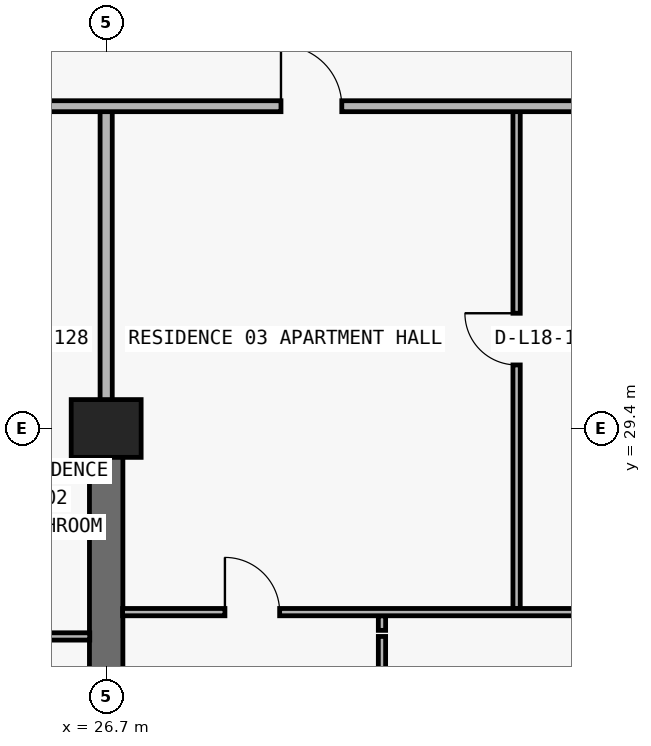
"""IFC4 building model, lengths in metres.
Left out: names, types, materials, properties, quantities, classifications, styles, units other than length and angle.
Written with IfcOpenShell. Run it as: python <this file> out.ifc"""

import sys

from ifc_helpers import new_model, si_unit, direction, frame, frame_2d, origin, origin_2d, place, context, subcontext, project, spatial, rectangle, extrude, element, fill, save


model = new_model("IFC4")
c1 = context("Model", 3, precision=1e-05, world=origin(), true_north=direction((0.0, 1.0)))
c2 = subcontext(c1, "Body", "Model", "MODEL_VIEW")
j1 = project(units=[si_unit("LENGTHUNIT", "METRE"), si_unit("PLANEANGLEUNIT", "RADIAN")], contexts=[c1])
p1 = place(None, origin())
s1 = spatial("IfcSite", under=j1, at=p1, CompositionType="ELEMENT")
p2 = place(p1, origin())
s2 = spatial("IfcBuilding", under=s1, at=p2, CompositionType="ELEMENT")
p3 = place(p2, frame((0.0, 0.0, 69.6)))
s3 = spatial("IfcBuildingStorey", under=s2, at=p3, CompositionType="ELEMENT", Elevation=69.6)
p4 = place(p3, frame((26.7, 29.4, 0.0), z_axis=(0.0, 0.0, 1.0), x_axis=(1.0, 0.0, 0.0)))
e1 = element("IfcColumn", 1, at=p4, inside=s3, PredefinedType="COLUMN", context=c2, shape_type="SweptSolid", body=[
    extrude(rectangle(XDim=1.15, YDim=0.95, at=origin_2d()), origin(), (0.0, 0.0, 1.0), 3.05),
])
p5 = place(p3, frame((26.7, 20.8, 0.0), z_axis=(0.0, 0.0, 1.0), x_axis=(0.0, 1.0, 0.0)))
e2 = element("IfcWall", 2, at=p5, inside=s3, PredefinedType="SHEAR", context=c2, shape_type="SweptSolid", body=[
    extrude(rectangle(XDim=8.6, YDim=0.55, at=frame_2d((4.3, 0.0))), origin(), (0.0, 0.0, 1.0), 3.05),
])
p6 = place(p3, frame((26.7, 29.405, 0.0), z_axis=(0.0, 0.0, 1.0), x_axis=(0.0, 1.0, 0.0)))
e3 = element("IfcWall", 3, at=p6, inside=s3, PredefinedType="PARTITIONING", context=c2, shape_type="SweptSolid", body=[
    extrude(rectangle(XDim=5.295, YDim=0.2, at=frame_2d((2.647, 0.0))), origin(), (0.0, 0.0, 1.0), 2.335),
])
p7 = place(p3, frame((31.236, 21.29, 0.0), z_axis=(0.0, 0.0, 1.0), x_axis=(0.0, 1.0, 0.0)))
e4 = element("IfcWall", 4, at=p7, inside=s3, PredefinedType="PARTITIONING", context=c2, shape_type="SweptSolid", body=[
    extrude(rectangle(XDim=4.69, YDim=0.12, at=frame_2d((2.345, 0.0))), origin(), (0.0, 0.0, 1.0), 3.05),
])
p8 = place(p7, frame((1.895, 0.0, 0.0)))
e5 = element("IfcOpeningElement", 5, at=p8, cuts=e4, PredefinedType="OPENING", context=c2, shape_type="SweptSolid", body=[
    extrude(rectangle(XDim=0.9, YDim=2.15, at=frame_2d((0.45, 1.075))), frame((0.0, 0.07, 0.0), z_axis=(0.0, -1.0, 0.0), x_axis=(1.0, 0.0, 0.0)), (0.0, 0.0, 1.0), 0.14),
])
p9 = place(p3, frame((31.236, 26.08, 0.0), z_axis=(0.0, 0.0, 1.0), x_axis=(0.0, 1.0, 0.0)))
e6 = element("IfcWall", 6, at=p9, inside=s3, PredefinedType="PARTITIONING", context=c2, shape_type="SweptSolid", body=[
    extrude(rectangle(XDim=0.24, YDim=0.12, at=frame_2d((0.12, 0.0))), origin(), (0.0, 0.0, 1.0), 3.05),
])
p10 = place(p3, frame((33.45, 26.44, 0.0), z_axis=(0.0, 0.0, 1.0), x_axis=(0.0, 1.0, 0.0)))
e7 = element("IfcWall", 7, at=p10, inside=s3, PredefinedType="PARTITIONING", context=c2, shape_type="SweptSolid", body=[
    extrude(rectangle(XDim=8.26, YDim=0.12, at=frame_2d((4.13, 0.0))), origin(), (0.0, 0.0, 1.0), 3.05),
])
p11 = place(p10, frame((4.005, 0.0, 0.0)))
e8 = element("IfcOpeningElement", 8, at=p11, cuts=e7, PredefinedType="OPENING", context=c2, shape_type="SweptSolid", body=[
    extrude(rectangle(XDim=0.85, YDim=2.1, at=frame_2d((0.425, 1.05))), frame((0.0, 0.07, 0.0), z_axis=(0.0, -1.0, 0.0), x_axis=(1.0, 0.0, 0.0)), (0.0, 0.0, 1.0), 0.14),
])
p12 = place(p3, frame((18.3, 25.98, 0.0), z_axis=(0.0, 0.0, 1.0), x_axis=(1.0, 0.0, 0.0)))
e9 = element("IfcWall", 9, at=p12, inside=s3, PredefinedType="PARTITIONING", context=c2, shape_type="SweptSolid", body=[
    extrude(rectangle(XDim=8.13, YDim=0.12, at=frame_2d((4.065, 0.0))), origin(), (0.0, 0.0, 1.0), 3.05),
])
p13 = place(p12, frame((1.693, 0.0, 0.0)))
e10 = element("IfcOpeningElement", 10, at=p13, cuts=e9, PredefinedType="OPENING", context=c2, shape_type="SweptSolid", body=[
    extrude(rectangle(XDim=0.9, YDim=2.15, at=frame_2d((0.45, 1.075))), frame((0.0, 0.07, 0.0), z_axis=(0.0, -1.0, 0.0), x_axis=(1.0, 0.0, 0.0)), (0.0, 0.0, 1.0), 0.14),
])
p14 = place(p3, frame((26.97, 26.38, 0.0), z_axis=(0.0, 0.0, 1.0), x_axis=(1.0, 0.0, 0.0)))
e11 = element("IfcWall", 11, at=p14, inside=s3, PredefinedType="PARTITIONING", context=c2, shape_type="SweptSolid", body=[
    extrude(rectangle(XDim=8.13, YDim=0.12, at=frame_2d((4.065, 0.0))), origin(), (0.0, 0.0, 1.0), 3.05),
])
p15 = place(p14, frame((1.683, 0.0, 0.0)))
e12 = element("IfcOpeningElement", 12, at=p15, cuts=e11, PredefinedType="OPENING", context=c2, shape_type="SweptSolid", body=[
    extrude(rectangle(XDim=0.9, YDim=2.15, at=frame_2d((0.45, 1.075))), frame((0.0, 0.07, 0.0), z_axis=(0.0, -1.0, 0.0), x_axis=(1.0, 0.0, 0.0)), (0.0, 0.0, 1.0), 0.14),
])
p16 = place(p3, frame((5.105, 34.7, 0.0), z_axis=(0.0, 0.0, 1.0), x_axis=(1.0, 0.0, 0.0)))
e13 = element("IfcWall", 13, at=p16, inside=s3, PredefinedType="PARTITIONING", context=c2, shape_type="SweptSolid", body=[
    extrude(rectangle(XDim=67.595, YDim=0.18, at=frame_2d((33.797, 0.0))), origin(), (0.0, 0.0, 1.0), 3.05),
])
p17 = place(p16, frame((7.67, 0.0, 0.0)))
e14 = element("IfcOpeningElement", 14, at=p17, cuts=e13, PredefinedType="OPENING", context=c2, shape_type="SweptSolid", body=[
    extrude(rectangle(XDim=1.0, YDim=2.2, at=frame_2d((0.5, 1.1))), frame((0.0, 0.1, 0.0), z_axis=(0.0, -1.0, 0.0), x_axis=(1.0, 0.0, 0.0)), (0.0, 0.0, 1.0), 0.2),
])
p18 = place(p16, frame((16.07, 0.0, 0.0)))
e15 = element("IfcOpeningElement", 15, at=p18, cuts=e13, PredefinedType="OPENING", context=c2, shape_type="SweptSolid", body=[
    extrude(rectangle(XDim=1.0, YDim=2.2, at=frame_2d((0.5, 1.1))), frame((0.0, 0.1, 0.0), z_axis=(0.0, -1.0, 0.0), x_axis=(1.0, 0.0, 0.0)), (0.0, 0.0, 1.0), 0.2),
])
p19 = place(p16, frame((24.47, 0.0, 0.0)))
e16 = element("IfcOpeningElement", 16, at=p19, cuts=e13, PredefinedType="OPENING", context=c2, shape_type="SweptSolid", body=[
    extrude(rectangle(XDim=1.0, YDim=2.2, at=frame_2d((0.5, 1.1))), frame((0.0, 0.1, 0.0), z_axis=(0.0, -1.0, 0.0), x_axis=(1.0, 0.0, 0.0)), (0.0, 0.0, 1.0), 0.2),
])
p20 = place(p16, frame((32.47, 0.0, 0.0)))
e17 = element("IfcOpeningElement", 17, at=p20, cuts=e13, PredefinedType="OPENING", context=c2, shape_type="SweptSolid", body=[
    extrude(rectangle(XDim=1.0, YDim=2.2, at=frame_2d((0.5, 1.1))), frame((0.0, 0.1, 0.0), z_axis=(0.0, -1.0, 0.0), x_axis=(1.0, 0.0, 0.0)), (0.0, 0.0, 1.0), 0.2),
])
p21 = place(p16, frame((40.47, 0.0, 0.0)))
e18 = element("IfcOpeningElement", 18, at=p21, cuts=e13, PredefinedType="OPENING", context=c2, shape_type="SweptSolid", body=[
    extrude(rectangle(XDim=1.0, YDim=2.2, at=frame_2d((0.5, 1.1))), frame((0.0, 0.1, 0.0), z_axis=(0.0, -1.0, 0.0), x_axis=(1.0, 0.0, 0.0)), (0.0, 0.0, 1.0), 0.2),
])
p22 = place(p16, frame((48.87, 0.0, 0.0)))
e19 = element("IfcOpeningElement", 19, at=p22, cuts=e13, PredefinedType="OPENING", context=c2, shape_type="SweptSolid", body=[
    extrude(rectangle(XDim=1.0, YDim=2.2, at=frame_2d((0.5, 1.1))), frame((0.0, 0.1, 0.0), z_axis=(0.0, -1.0, 0.0), x_axis=(1.0, 0.0, 0.0)), (0.0, 0.0, 1.0), 0.2),
])
p23 = place(p16, frame((57.27, 0.0, 0.0)))
e20 = element("IfcOpeningElement", 20, at=p23, cuts=e13, PredefinedType="OPENING", context=c2, shape_type="SweptSolid", body=[
    extrude(rectangle(XDim=1.0, YDim=2.2, at=frame_2d((0.5, 1.1))), frame((0.0, 0.1, 0.0), z_axis=(0.0, -1.0, 0.0), x_axis=(1.0, 0.0, 0.0)), (0.0, 0.0, 1.0), 0.2),
])
p24 = place(p19, origin())
e21 = element("IfcDoor", 21, at=p24, inside=s3, OperationType="SINGLE_SWING_LEFT", PredefinedType="DOOR", context=c2, shape_type="SweptSolid", body=[
    extrude(rectangle(XDim=1.0, YDim=2.2, at=frame_2d((0.5, 1.1))), frame((0.0, 0.025, 0.0), z_axis=(0.0, -1.0, 0.0), x_axis=(1.0, 0.0, 0.0)), (0.0, 0.0, 1.0), 0.05),
])
fill(e16, e21)
p25 = place(p11, origin())
e22 = element("IfcDoor", 22, at=p25, inside=s3, OperationType="SINGLE_SWING_RIGHT", PredefinedType="DOOR", context=c2, shape_type="SweptSolid", body=[
    extrude(rectangle(XDim=0.85, YDim=2.1, at=frame_2d((0.425, 1.05))), frame((0.0, 0.025, 0.0), z_axis=(0.0, -1.0, 0.0), x_axis=(1.0, 0.0, 0.0)), (0.0, 0.0, 1.0), 0.05),
])
fill(e8, e22)
p26 = place(p15, origin())
e23 = element("IfcDoor", 23, at=p26, inside=s3, OperationType="SINGLE_SWING_LEFT", PredefinedType="DOOR", context=c2, shape_type="SweptSolid", body=[
    extrude(rectangle(XDim=0.9, YDim=2.15, at=frame_2d((0.45, 1.075))), frame((0.0, 0.025, 0.0), z_axis=(0.0, -1.0, 0.0), x_axis=(1.0, 0.0, 0.0)), (0.0, 0.0, 1.0), 0.05),
])
fill(e12, e23)
save(model, sys.argv[1])
